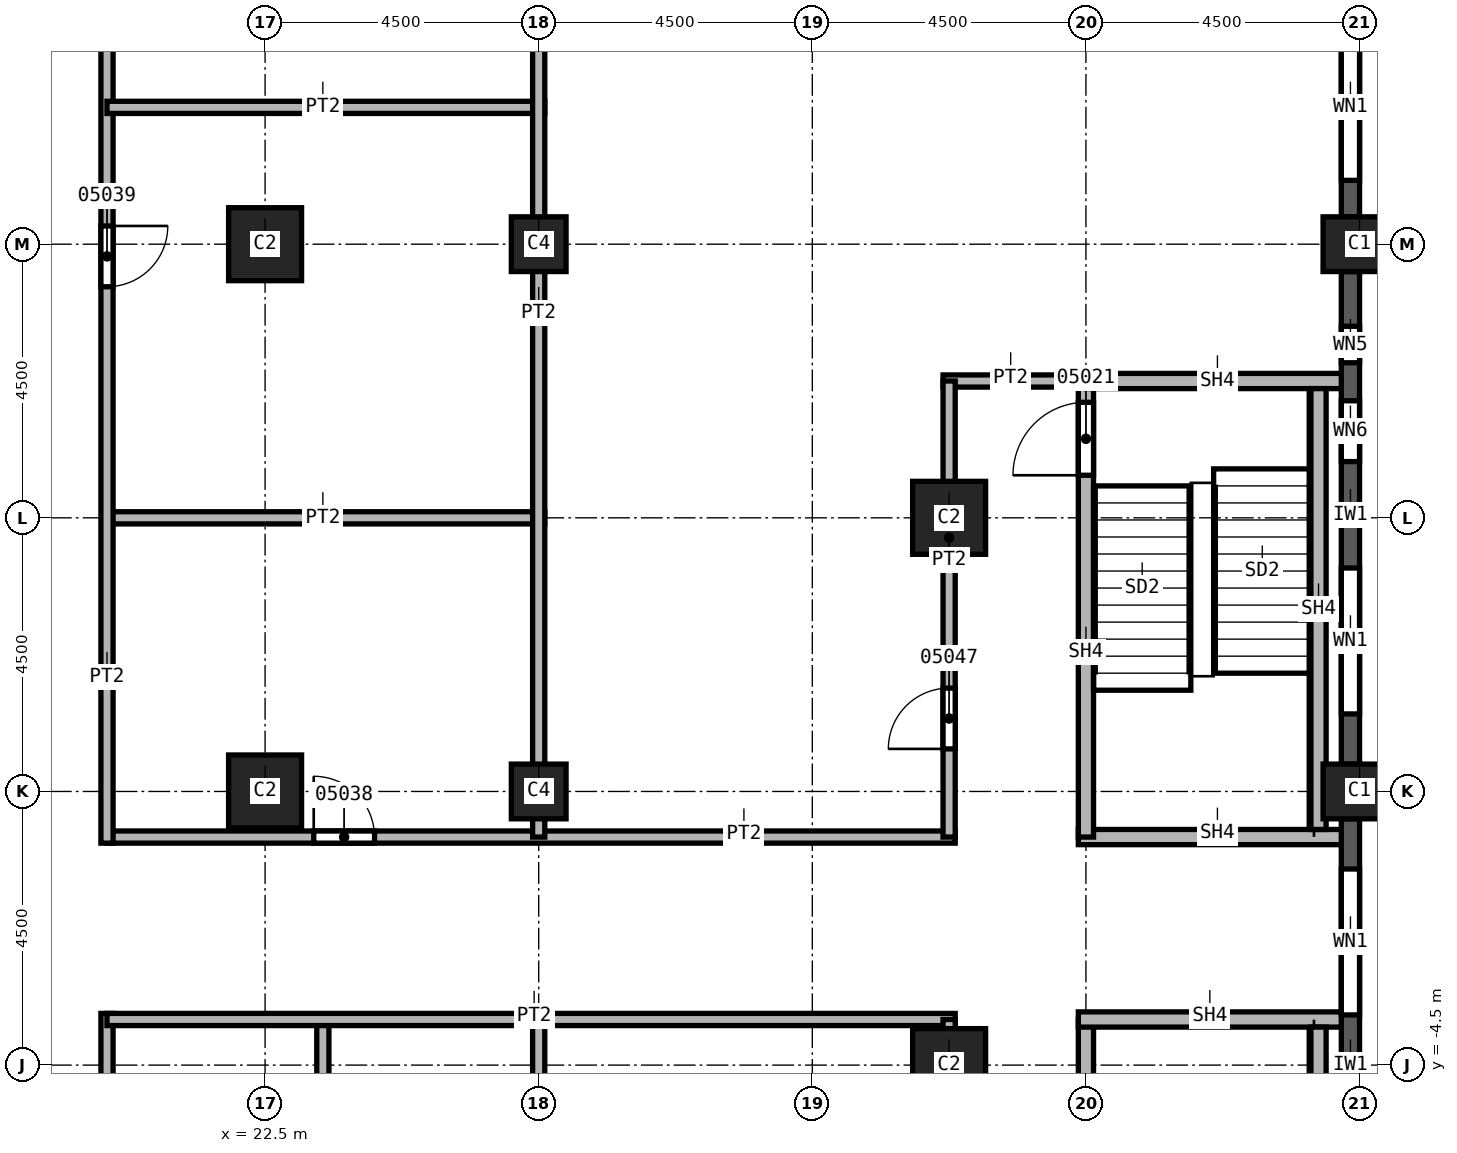
"""IFC4 building model, lengths in metres.
Left out: names, types, materials, properties, quantities, classifications, styles, units other than length and angle.
Written with IfcOpenShell. Run it as: python <this file> out.ifc"""

import sys

from ifc_helpers import new_model, si_unit, direction, frame, frame_2d, origin, origin_2d, place, context, subcontext, project, spatial, rectangle, extrude, element, fill, save


model = new_model("IFC4")
c1 = context("Model", 3, precision=1e-05, world=origin(), true_north=direction((0.0, 1.0)))
c2 = subcontext(c1, "Body", "Model", "MODEL_VIEW")
j1 = project(units=[si_unit("LENGTHUNIT", "METRE"), si_unit("PLANEANGLEUNIT", "RADIAN")], contexts=[c1])
p1 = place(None, origin())
s1 = spatial("IfcSite", under=j1, at=p1, CompositionType="ELEMENT")
p2 = place(p1, origin())
s2 = spatial("IfcBuilding", under=s1, at=p2, CompositionType="ELEMENT")
p3 = place(p2, frame((0.0, 0.0, 112.0)))
s3 = spatial("IfcBuildingStorey", under=s2, at=p3, CompositionType="ELEMENT", Elevation=112.0)
for number, where, z_axis, x_axis in (
    (1, (40.5, 0.0, 0.0), (0.0, 0.0, 1.0), (0.0, 1.0, 0.0)),
    (2, (40.5, 9.0, 0.0), (0.0, 0.0, 1.0), (0.0, 1.0, 0.0)),
):
    element("IfcColumn", number, at=place(p3, frame(where, z_axis=z_axis, x_axis=x_axis)), inside=s3, PredefinedType="COLUMN", context=c2, shape_type="SweptSolid", body=[
        extrude(rectangle(XDim=0.9, YDim=1.2, at=origin_2d()), origin(), (0.0, 0.0, 1.0), 3.7),
    ])
for number, where, z_axis, x_axis in (
    (3, (33.75, 4.5, 0.0), (0.0, 0.0, 1.0), (1.0, 0.0, 0.0)),
    (4, (33.75, -4.5, 0.0), (0.0, 0.0, 1.0), (1.0, 0.0, 0.0)),
    (5, (22.5, 0.0, 0.0), (0.0, 0.0, 1.0), (1.0, 0.0, 0.0)),
    (6, (22.5, 9.0, 0.0), (0.0, 0.0, 1.0), (1.0, 0.0, 0.0)),
):
    element("IfcColumn", number, at=place(p3, frame(where, z_axis=z_axis, x_axis=x_axis)), inside=s3, PredefinedType="COLUMN", context=c2, shape_type="SweptSolid", body=[
        extrude(rectangle(XDim=1.2, YDim=1.2, at=origin_2d()), origin(), (0.0, 0.0, 1.0), 3.7),
    ])
for number, where, z_axis, x_axis in (
    (7, (27.0, 0.0, 0.0), (0.0, 0.0, 1.0), (1.0, 0.0, 0.0)),
    (8, (27.0, 9.0, 0.0), (0.0, 0.0, 1.0), (1.0, 0.0, 0.0)),
):
    element("IfcColumn", number, at=place(p3, frame(where, z_axis=z_axis, x_axis=x_axis)), inside=s3, PredefinedType="COLUMN", context=c2, shape_type="SweptSolid", body=[
        extrude(rectangle(XDim=0.9, YDim=0.9, at=origin_2d()), origin(), (0.0, 0.0, 1.0), 3.7),
    ])
p4 = place(p3, frame((40.35, -8.55, 0.0), z_axis=(0.0, 0.0, 1.0), x_axis=(0.0, 1.0, 0.0)))
e9 = element("IfcWall", 9, at=p4, inside=s3, PredefinedType="SOLIDWALL", context=c2, shape_type="SweptSolid", body=[
    extrude(rectangle(XDim=8.1, YDim=0.3, at=frame_2d((4.05, 0.0))), origin(), (0.0, 0.0, 1.0), 3.1),
])
p5 = place(p4, frame((0.825, 0.0, 0.8)))
e10 = element("IfcOpeningElement", 10, at=p5, cuts=e9, PredefinedType="OPENING", context=c2, shape_type="SweptSolid", body=[
    extrude(rectangle(XDim=2.4, YDim=1.95, at=frame_2d((1.2, 0.975))), frame((0.0, 0.15, 0.0), z_axis=(0.0, -1.0, 0.0), x_axis=(1.0, 0.0, 0.0)), (0.0, 0.0, 1.0), 0.3),
])
p6 = place(p4, frame((4.875, 0.0, 0.8)))
e11 = element("IfcOpeningElement", 11, at=p6, cuts=e9, PredefinedType="OPENING", context=c2, shape_type="SweptSolid", body=[
    extrude(rectangle(XDim=2.4, YDim=1.95, at=frame_2d((1.2, 0.975))), frame((0.0, 0.15, 0.0), z_axis=(0.0, -1.0, 0.0), x_axis=(1.0, 0.0, 0.0)), (0.0, 0.0, 1.0), 0.3),
])
p7 = place(p3, frame((40.35, 0.45, 0.0), z_axis=(0.0, 0.0, 1.0), x_axis=(0.0, 1.0, 0.0)))
e12 = element("IfcWall", 12, at=p7, inside=s3, PredefinedType="SOLIDWALL", context=c2, shape_type="SweptSolid", body=[
    extrude(rectangle(XDim=8.1, YDim=0.3, at=frame_2d((4.05, 0.0))), origin(), (0.0, 0.0, 1.0), 3.1),
])
p8 = place(p7, frame((0.825, 0.0, 0.8)))
e13 = element("IfcOpeningElement", 13, at=p8, cuts=e12, PredefinedType="OPENING", context=c2, shape_type="SweptSolid", body=[
    extrude(rectangle(XDim=2.4, YDim=1.95, at=frame_2d((1.2, 0.975))), frame((0.0, 0.15, 0.0), z_axis=(0.0, -1.0, 0.0), x_axis=(1.0, 0.0, 0.0)), (0.0, 0.0, 1.0), 0.3),
])
p9 = place(p7, frame((4.975, 0.0, 0.8)))
e14 = element("IfcOpeningElement", 14, at=p9, cuts=e12, PredefinedType="OPENING", context=c2, shape_type="SweptSolid", body=[
    extrude(rectangle(XDim=1.0, YDim=1.95, at=frame_2d((0.5, 0.975))), frame((0.0, 0.15, 0.0), z_axis=(0.0, -1.0, 0.0), x_axis=(1.0, 0.0, 0.0)), (0.0, 0.0, 1.0), 0.3),
])
p10 = place(p7, frame((6.6, 0.0, 0.8)))
e15 = element("IfcOpeningElement", 15, at=p10, cuts=e12, PredefinedType="OPENING", context=c2, shape_type="SweptSolid", body=[
    extrude(rectangle(XDim=0.6, YDim=1.95, at=frame_2d((0.3, 0.975))), frame((0.0, 0.15, 0.0), z_axis=(0.0, -1.0, 0.0), x_axis=(1.0, 0.0, 0.0)), (0.0, 0.0, 1.0), 0.3),
])
p11 = place(p3, frame((40.35, 9.45, 0.0), z_axis=(0.0, 0.0, 1.0), x_axis=(0.0, 1.0, 0.0)))
e16 = element("IfcWall", 16, at=p11, inside=s3, PredefinedType="SOLIDWALL", context=c2, shape_type="SweptSolid", body=[
    extrude(rectangle(XDim=3.6, YDim=0.3, at=frame_2d((1.8, 0.0))), origin(), (0.0, 0.0, 1.0), 3.1),
])
p12 = place(p11, frame((0.6, 0.0, 0.8)))
e17 = element("IfcOpeningElement", 17, at=p12, cuts=e16, PredefinedType="OPENING", context=c2, shape_type="SweptSolid", body=[
    extrude(rectangle(XDim=2.4, YDim=1.95, at=frame_2d((1.2, 0.975))), frame((0.0, 0.15, 0.0), z_axis=(0.0, -1.0, 0.0), x_axis=(1.0, 0.0, 0.0)), (0.0, 0.0, 1.0), 0.3),
])
p13 = place(p3, frame((19.9, -3.65, 0.0), z_axis=(0.0, 0.0, 1.0), x_axis=(0.0, -1.0, 0.0)))
e18 = element("IfcWall", 18, at=p13, inside=s3, PredefinedType="PARTITIONING", context=c2, shape_type="SweptSolid", body=[
    extrude(rectangle(XDim=20.85, YDim=0.2, at=frame_2d((10.425, 0.0))), origin(), (0.0, 0.0, 1.0), 3.7),
])
p14 = place(p13, frame((17.5, 0.0, 0.0)))
e19 = element("IfcOpeningElement", 19, at=p14, cuts=e18, PredefinedType="OPENING", context=c2, shape_type="SweptSolid", body=[
    extrude(rectangle(XDim=1.0, YDim=2.1, at=frame_2d((0.5, 1.05))), frame((0.0, 0.1, 0.0), z_axis=(0.0, -1.0, 0.0), x_axis=(1.0, 0.0, 0.0)), (0.0, 0.0, 1.0), 0.2),
])
p15 = place(p13, frame((6.25, 0.0, 0.0)))
e20 = element("IfcOpeningElement", 20, at=p15, cuts=e18, PredefinedType="OPENING", context=c2, shape_type="SweptSolid", body=[
    extrude(rectangle(XDim=1.0, YDim=2.1, at=frame_2d((0.5, 1.05))), frame((0.0, 0.1, 0.0), z_axis=(0.0, -1.0, 0.0), x_axis=(1.0, 0.0, 0.0)), (0.0, 0.0, 1.0), 0.2),
])
p16 = place(p3, frame((19.9, -0.75, 0.0), z_axis=(0.0, 0.0, 1.0), x_axis=(1.0, 0.0, 0.0)))
e21 = element("IfcWall", 21, at=p16, inside=s3, PredefinedType="PARTITIONING", context=c2, shape_type="SweptSolid", body=[
    extrude(rectangle(XDim=13.95, YDim=0.2, at=frame_2d((6.975, 0.0))), origin(), (0.0, 0.0, 1.0), 3.7),
])
p17 = place(p16, frame((3.4, 0.0, 0.0)))
e22 = element("IfcOpeningElement", 22, at=p17, cuts=e21, PredefinedType="OPENING", context=c2, shape_type="SweptSolid", body=[
    extrude(rectangle(XDim=1.0, YDim=2.1, at=frame_2d((0.5, 1.05))), frame((0.0, 0.1, 0.0), z_axis=(0.0, -1.0, 0.0), x_axis=(1.0, 0.0, 0.0)), (0.0, 0.0, 1.0), 0.2),
])
p18 = place(p3, frame((19.9, 4.5, 0.0), z_axis=(0.0, 0.0, 1.0), x_axis=(1.0, 0.0, 0.0)))
e23 = element("IfcWall", 23, at=p18, inside=s3, PredefinedType="PARTITIONING", context=c2, shape_type="SweptSolid", body=[
    extrude(rectangle(XDim=7.2, YDim=0.2, at=frame_2d((3.6, 0.0))), origin(), (0.0, 0.0, 1.0), 3.7),
])
p19 = place(p3, frame((19.9, 24.5, 0.0), z_axis=(0.0, 0.0, 1.0), x_axis=(0.0, -1.0, 0.0)))
e24 = element("IfcWall", 24, at=p19, inside=s3, PredefinedType="PARTITIONING", context=c2, shape_type="SweptSolid", body=[
    extrude(rectangle(XDim=25.35, YDim=0.2, at=frame_2d((12.675, 0.0))), origin(), (0.0, 0.0, 1.0), 3.7),
])
p20 = place(p19, frame((15.2, 0.0, 0.0)))
e25 = element("IfcOpeningElement", 25, at=p20, cuts=e24, PredefinedType="OPENING", context=c2, shape_type="SweptSolid", body=[
    extrude(rectangle(XDim=1.0, YDim=2.1, at=frame_2d((0.5, 1.05))), frame((0.0, 0.1, 0.0), z_axis=(0.0, -1.0, 0.0), x_axis=(1.0, 0.0, 0.0)), (0.0, 0.0, 1.0), 0.2),
])
p21 = place(p19, frame((7.55, 0.0, 0.0)))
e26 = element("IfcOpeningElement", 26, at=p21, cuts=e24, PredefinedType="OPENING", context=c2, shape_type="SweptSolid", body=[
    extrude(rectangle(XDim=1.0, YDim=2.1, at=frame_2d((0.5, 1.05))), frame((0.0, 0.1, 0.0), z_axis=(0.0, -1.0, 0.0), x_axis=(1.0, 0.0, 0.0)), (0.0, 0.0, 1.0), 0.2),
])
p22 = place(p19, frame((0.55, 0.0, 0.0)))
e27 = element("IfcOpeningElement", 27, at=p22, cuts=e24, PredefinedType="OPENING", context=c2, shape_type="SweptSolid", body=[
    extrude(rectangle(XDim=1.0, YDim=2.1, at=frame_2d((0.5, 1.05))), frame((0.0, 0.1, 0.0), z_axis=(0.0, -1.0, 0.0), x_axis=(1.0, 0.0, 0.0)), (0.0, 0.0, 1.0), 0.2),
])
p23 = place(p3, frame((19.9, 11.25, 0.0), z_axis=(0.0, 0.0, 1.0), x_axis=(1.0, 0.0, 0.0)))
e28 = element("IfcWall", 28, at=p23, inside=s3, PredefinedType="PARTITIONING", context=c2, shape_type="SweptSolid", body=[
    extrude(rectangle(XDim=7.2, YDim=0.2, at=frame_2d((3.6, 0.0))), origin(), (0.0, 0.0, 1.0), 3.7),
])
p24 = place(p3, frame((23.45, -3.75, 0.0), z_axis=(0.0, 0.0, 1.0), x_axis=(0.0, -1.0, 0.0)))
e29 = element("IfcWall", 29, at=p24, inside=s3, PredefinedType="PARTITIONING", context=c2, shape_type="SweptSolid", body=[
    extrude(rectangle(XDim=9.75, YDim=0.2, at=frame_2d((4.875, 0.0))), origin(), (0.0, 0.0, 1.0), 3.7),
])
p25 = place(p24, frame((6.1, 0.0, 0.0)))
e30 = element("IfcOpeningElement", 30, at=p25, cuts=e29, PredefinedType="OPENING", context=c2, shape_type="SweptSolid", body=[
    extrude(rectangle(XDim=1.0, YDim=2.1, at=frame_2d((0.5, 1.05))), frame((0.0, 0.1, 0.0), z_axis=(0.0, -1.0, 0.0), x_axis=(1.0, 0.0, 0.0)), (0.0, 0.0, 1.0), 0.2),
])
p26 = place(p3, frame((33.85, -3.75, 0.0), z_axis=(0.0, 0.0, 1.0), x_axis=(-1.0, 0.0, 0.0)))
e31 = element("IfcWall", 31, at=p26, inside=s3, PredefinedType="PARTITIONING", context=c2, shape_type="SweptSolid", body=[
    extrude(rectangle(XDim=13.95, YDim=0.2, at=frame_2d((6.975, 0.0))), origin(), (0.0, 0.0, 1.0), 3.7),
])
p27 = place(p3, frame((27.0, -3.75, 0.0), z_axis=(0.0, 0.0, 1.0), x_axis=(0.0, -1.0, 0.0)))
e32 = element("IfcWall", 32, at=p27, inside=s3, PredefinedType="PARTITIONING", context=c2, shape_type="SweptSolid", body=[
    extrude(rectangle(XDim=13.65, YDim=0.2, at=frame_2d((6.825, 0.0))), origin(), (0.0, 0.0, 1.0), 3.7),
])
p28 = place(p3, frame((27.0, 17.4, 0.0), z_axis=(0.0, 0.0, 1.0), x_axis=(0.0, -1.0, 0.0)))
e33 = element("IfcWall", 33, at=p28, inside=s3, PredefinedType="PARTITIONING", context=c2, shape_type="SweptSolid", body=[
    extrude(rectangle(XDim=18.15, YDim=0.2, at=frame_2d((9.075, 0.0))), origin(), (0.0, 0.0, 1.0), 3.7),
])
p29 = place(p3, frame((33.65, 6.75, 0.0), z_axis=(0.0, 0.0, 1.0), x_axis=(1.0, 0.0, 0.0)))
e34 = element("IfcWall", 34, at=p29, inside=s3, PredefinedType="PARTITIONING", context=c2, shape_type="SweptSolid", body=[
    extrude(rectangle(XDim=2.35, YDim=0.2, at=frame_2d((1.175, 0.0))), origin(), (0.0, 0.0, 1.0), 3.7),
])
p30 = place(p3, frame((33.75, -11.25, 0.0), z_axis=(0.0, 0.0, 1.0), x_axis=(0.0, 1.0, 0.0)))
e35 = element("IfcWall", 35, at=p30, inside=s3, PredefinedType="PARTITIONING", context=c2, shape_type="SweptSolid", body=[
    extrude(rectangle(XDim=7.5, YDim=0.2, at=frame_2d((3.75, 0.0))), origin(), (0.0, 0.0, 1.0), 3.7),
])
p31 = place(p30, frame((0.55, 0.0, 0.0)))
e36 = element("IfcOpeningElement", 36, at=p31, cuts=e35, PredefinedType="OPENING", context=c2, shape_type="SweptSolid", body=[
    extrude(rectangle(XDim=1.0, YDim=2.1, at=frame_2d((0.5, 1.05))), frame((0.0, 0.1, 0.0), z_axis=(0.0, -1.0, 0.0), x_axis=(1.0, 0.0, 0.0)), (0.0, 0.0, 1.0), 0.2),
])
p32 = place(p3, frame((33.75, -0.75, 0.0), z_axis=(0.0, 0.0, 1.0), x_axis=(0.0, 1.0, 0.0)))
e37 = element("IfcWall", 37, at=p32, inside=s3, PredefinedType="PARTITIONING", context=c2, shape_type="SweptSolid", body=[
    extrude(rectangle(XDim=7.5, YDim=0.2, at=frame_2d((3.75, 0.0))), origin(), (0.0, 0.0, 1.0), 3.7),
])
p33 = place(p32, frame((1.45, 0.0, 0.0)))
e38 = element("IfcOpeningElement", 38, at=p33, cuts=e37, PredefinedType="OPENING", context=c2, shape_type="SweptSolid", body=[
    extrude(rectangle(XDim=1.0, YDim=2.1, at=frame_2d((0.5, 1.05))), frame((0.0, 0.1, 0.0), z_axis=(0.0, -1.0, 0.0), x_axis=(1.0, 0.0, 0.0)), (0.0, 0.0, 1.0), 0.2),
])
p34 = place(p3, frame((35.875, -0.75, 0.0), z_axis=(0.0, 0.0, 1.0), x_axis=(1.0, 0.0, 0.0)))
e39 = element("IfcWall", 39, at=p34, inside=s3, PredefinedType="SOLIDWALL", context=c2, shape_type="SweptSolid", body=[
    extrude(rectangle(XDim=4.325, YDim=0.25, at=frame_2d((2.163, 0.0))), origin(), (0.0, 0.0, 1.0), 3.7),
])
p35 = place(p3, frame((36.0, -11.375, 0.0), z_axis=(0.0, 0.0, 1.0), x_axis=(0.0, 1.0, 0.0)))
e40 = element("IfcWall", 40, at=p35, inside=s3, PredefinedType="SOLIDWALL", context=c2, shape_type="SweptSolid", body=[
    extrude(rectangle(XDim=7.625, YDim=0.25, at=frame_2d((3.812, 0.0))), origin(), (0.0, 0.0, 1.0), 3.7),
])
p36 = place(p35, frame((0.4, 0.0, 0.0)))
e41 = element("IfcOpeningElement", 41, at=p36, cuts=e40, PredefinedType="OPENING", context=c2, shape_type="SweptSolid", body=[
    extrude(rectangle(XDim=1.2, YDim=2.1, at=frame_2d((0.6, 1.05))), frame((0.0, 0.125, 0.0), z_axis=(0.0, -1.0, 0.0), x_axis=(1.0, 0.0, 0.0)), (0.0, 0.0, 1.0), 0.25),
])
p37 = place(p3, frame((36.0, -0.75, 0.0), z_axis=(0.0, 0.0, 1.0), x_axis=(0.0, 1.0, 0.0)))
e42 = element("IfcWall", 42, at=p37, inside=s3, PredefinedType="SOLIDWALL", context=c2, shape_type="SweptSolid", body=[
    extrude(rectangle(XDim=7.625, YDim=0.25, at=frame_2d((3.812, 0.0))), origin(), (0.0, 0.0, 1.0), 3.7),
])
p38 = place(p37, frame((5.95, 0.0, 0.0)))
e43 = element("IfcOpeningElement", 43, at=p38, cuts=e42, PredefinedType="OPENING", context=c2, shape_type="SweptSolid", body=[
    extrude(rectangle(XDim=1.2, YDim=2.1, at=frame_2d((0.6, 1.05))), frame((0.0, 0.125, 0.0), z_axis=(0.0, -1.0, 0.0), x_axis=(1.0, 0.0, 0.0)), (0.0, 0.0, 1.0), 0.25),
])
p39 = place(p3, frame((36.0, 6.75, 0.0), z_axis=(0.0, 0.0, 1.0), x_axis=(1.0, 0.0, 0.0)))
e44 = element("IfcWall", 44, at=p39, inside=s3, PredefinedType="SOLIDWALL", context=c2, shape_type="SweptSolid", body=[
    extrude(rectangle(XDim=4.2, YDim=0.25, at=frame_2d((2.1, 0.0))), origin(), (0.0, 0.0, 1.0), 3.7),
])
p40 = place(p3, frame((40.2, -3.75, 0.0), z_axis=(0.0, 0.0, 1.0), x_axis=(-1.0, 0.0, 0.0)))
e45 = element("IfcWall", 45, at=p40, inside=s3, PredefinedType="SOLIDWALL", context=c2, shape_type="SweptSolid", body=[
    extrude(rectangle(XDim=4.325, YDim=0.25, at=frame_2d((2.163, 0.0))), origin(), (0.0, 0.0, 1.0), 3.7),
])
for number, where, z_axis, x_axis in (
    (46, (39.825, -11.125, 0.0), (0.0, 0.0, 1.0), (0.0, 1.0, 0.0)),
    (47, (39.825, -0.625, 0.0), (0.0, 0.0, 1.0), (0.0, 1.0, 0.0)),
):
    element("IfcWall", number, at=place(p3, frame(where, z_axis=z_axis, x_axis=x_axis)), inside=s3, PredefinedType="SOLIDWALL", context=c2, shape_type="SweptSolid", body=[
        extrude(rectangle(XDim=7.25, YDim=0.25, at=frame_2d((3.625, 0.0))), origin(), (0.0, 0.0, 1.0), 3.7),
    ])
p41 = place(p6, origin())
e48 = element("IfcWindow", 48, at=p41, inside=s3, PartitioningType="SINGLE_PANEL", PredefinedType="WINDOW", context=c2, shape_type="SweptSolid", body=[
    extrude(rectangle(XDim=2.4, YDim=1.95, at=frame_2d((1.2, 0.975))), frame((0.0, 0.03, 0.0), z_axis=(0.0, -1.0, 0.0), x_axis=(1.0, 0.0, 0.0)), (0.0, 0.0, 1.0), 0.06),
])
fill(e11, e48)
p42 = place(p8, origin())
e49 = element("IfcWindow", 49, at=p42, inside=s3, PartitioningType="SINGLE_PANEL", PredefinedType="WINDOW", context=c2, shape_type="SweptSolid", body=[
    extrude(rectangle(XDim=2.4, YDim=1.95, at=frame_2d((1.2, 0.975))), frame((0.0, 0.03, 0.0), z_axis=(0.0, -1.0, 0.0), x_axis=(1.0, 0.0, 0.0)), (0.0, 0.0, 1.0), 0.06),
])
fill(e13, e49)
p43 = place(p12, origin())
e50 = element("IfcWindow", 50, at=p43, inside=s3, PartitioningType="SINGLE_PANEL", PredefinedType="WINDOW", context=c2, shape_type="SweptSolid", body=[
    extrude(rectangle(XDim=2.4, YDim=1.95, at=frame_2d((1.2, 0.975))), frame((0.0, 0.03, 0.0), z_axis=(0.0, -1.0, 0.0), x_axis=(1.0, 0.0, 0.0)), (0.0, 0.0, 1.0), 0.06),
])
fill(e17, e50)
p44 = place(p38, origin())
e51 = element("IfcDoor", 51, at=p44, inside=s3, OperationType="SINGLE_SWING_RIGHT", PredefinedType="DOOR", context=c2, shape_type="SweptSolid", body=[
    extrude(rectangle(XDim=1.2, YDim=2.1, at=frame_2d((0.6, 1.05))), frame((0.0, 0.025, 0.0), z_axis=(0.0, -1.0, 0.0), x_axis=(1.0, 0.0, 0.0)), (0.0, 0.0, 1.0), 0.05),
])
fill(e43, e51)
p45 = place(p17, origin())
e52 = element("IfcDoor", 52, at=p45, inside=s3, OperationType="SINGLE_SWING_LEFT", PredefinedType="DOOR", context=c2, shape_type="SweptSolid", body=[
    extrude(rectangle(XDim=1.0, YDim=2.1, at=frame_2d((0.5, 1.05))), frame((0.0, 0.025, 0.0), z_axis=(0.0, -1.0, 0.0), x_axis=(1.0, 0.0, 0.0)), (0.0, 0.0, 1.0), 0.05),
])
fill(e22, e52)
p46 = place(p20, origin())
e53 = element("IfcDoor", 53, at=p46, inside=s3, OperationType="SINGLE_SWING_RIGHT", PredefinedType="DOOR", context=c2, shape_type="SweptSolid", body=[
    extrude(rectangle(XDim=1.0, YDim=2.1, at=frame_2d((0.5, 1.05))), frame((0.0, 0.025, 0.0), z_axis=(0.0, -1.0, 0.0), x_axis=(1.0, 0.0, 0.0)), (0.0, 0.0, 1.0), 0.05),
])
fill(e25, e53)
p47 = place(p33, origin())
e54 = element("IfcDoor", 54, at=p47, inside=s3, OperationType="SINGLE_SWING_RIGHT", PredefinedType="DOOR", context=c2, shape_type="SweptSolid", body=[
    extrude(rectangle(XDim=1.0, YDim=2.1, at=frame_2d((0.5, 1.05))), frame((0.0, 0.025, 0.0), z_axis=(0.0, -1.0, 0.0), x_axis=(1.0, 0.0, 0.0)), (0.0, 0.0, 1.0), 0.05),
])
fill(e38, e54)
p48 = place(p9, origin())
e55 = element("IfcWindow", 55, at=p48, inside=s3, PartitioningType="SINGLE_PANEL", PredefinedType="WINDOW", context=c2, shape_type="SweptSolid", body=[
    extrude(rectangle(XDim=1.0, YDim=1.95, at=frame_2d((0.5, 0.975))), frame((0.0, 0.03, 0.0), z_axis=(0.0, -1.0, 0.0), x_axis=(1.0, 0.0, 0.0)), (0.0, 0.0, 1.0), 0.06),
])
fill(e14, e55)
p49 = place(p10, origin())
e56 = element("IfcWindow", 56, at=p49, inside=s3, PartitioningType="SINGLE_PANEL", PredefinedType="WINDOW", context=c2, shape_type="SweptSolid", body=[
    extrude(rectangle(XDim=0.6, YDim=1.95, at=frame_2d((0.3, 0.975))), frame((0.0, 0.03, 0.0), z_axis=(0.0, -1.0, 0.0), x_axis=(1.0, 0.0, 0.0)), (0.0, 0.0, 1.0), 0.06),
])
fill(e15, e56)
save(model, sys.argv[1])
